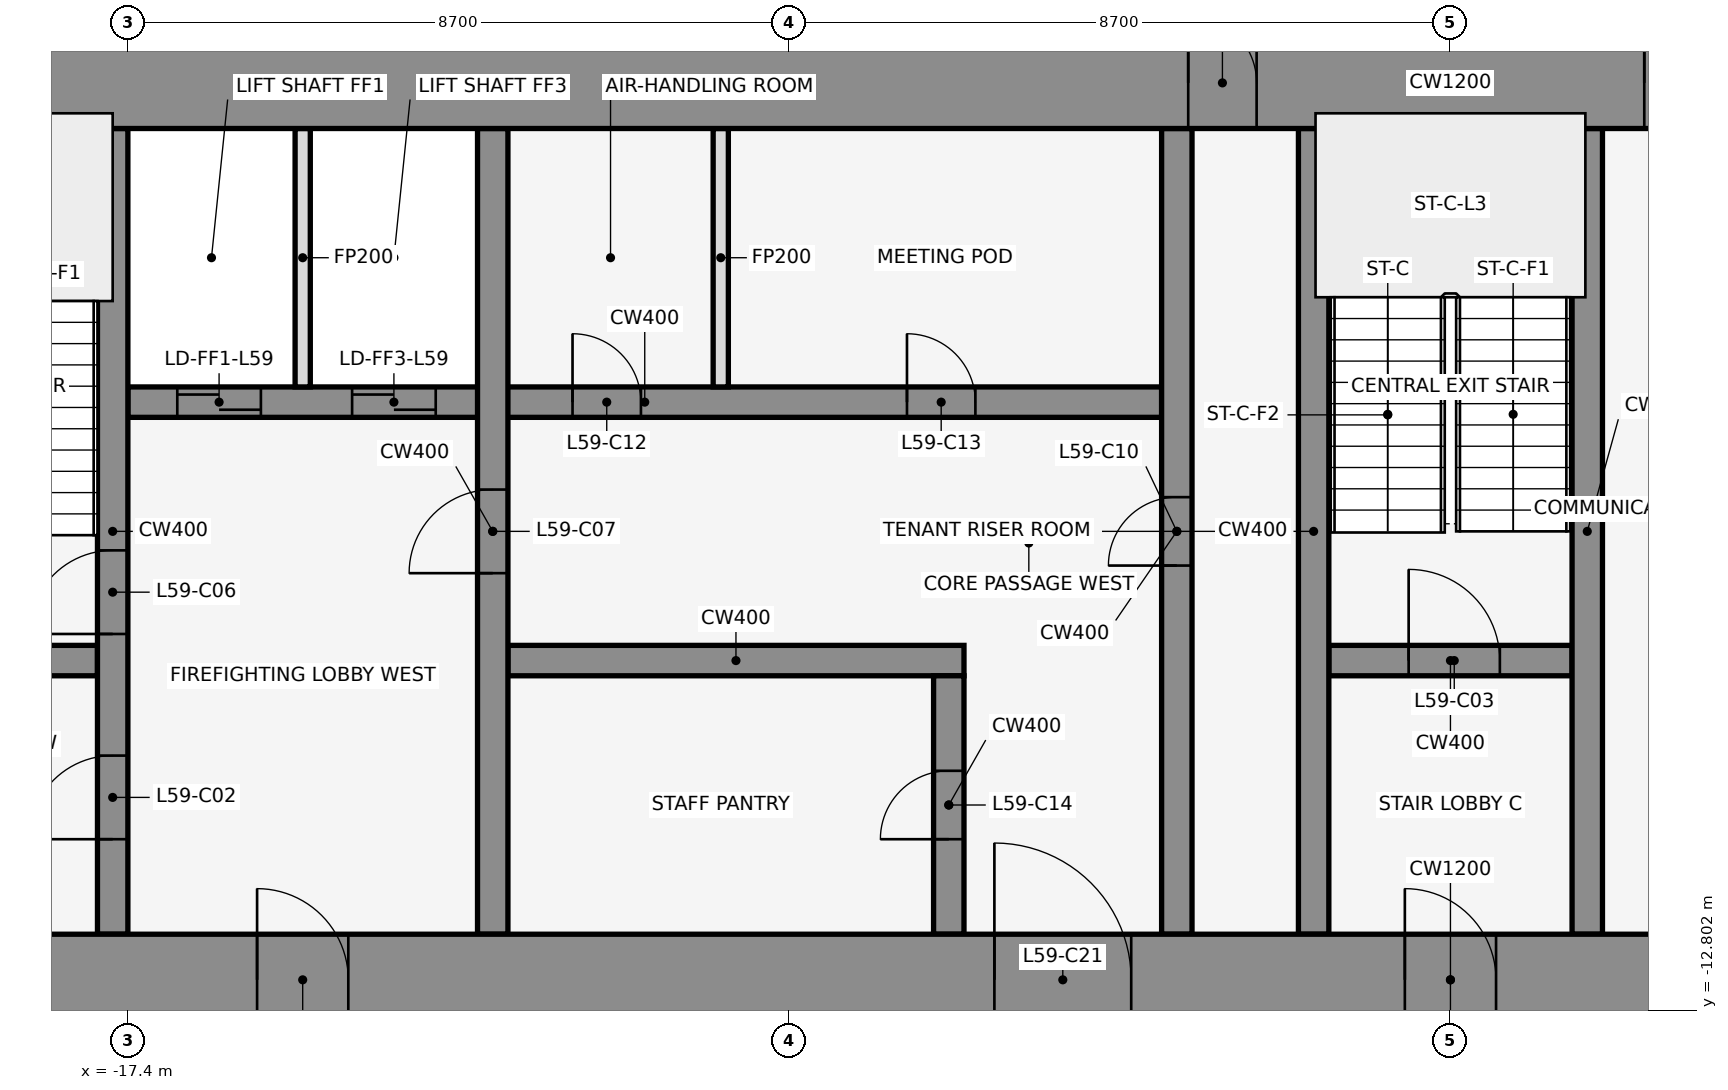
"""IFC4 building model, lengths in metres.
Left out: names, types, materials, properties, quantities, classifications, styles, units other than length and angle.
Written with IfcOpenShell. Run it as: python <this file> out.ifc"""

import sys

from ifc_helpers import new_model, si_unit, direction, frame, frame_2d, origin, place, context, subcontext, project, spatial, rectangle, extrude, element, fill, save


model = new_model("IFC4")
c1 = context("Model", 3, precision=1e-05, world=origin(), true_north=direction((0.0, 1.0)))
c2 = subcontext(c1, "Body", "Model", "MODEL_VIEW")
j1 = project(units=[si_unit("LENGTHUNIT", "METRE"), si_unit("PLANEANGLEUNIT", "RADIAN")], contexts=[c1])
p1 = place(None, origin())
s1 = spatial("IfcSite", under=j1, at=p1, CompositionType="ELEMENT")
p2 = place(p1, origin())
s2 = spatial("IfcBuilding", under=s1, at=p2, CompositionType="ELEMENT")
p3 = place(p2, frame((0.0, 0.0, 262.4)))
s3 = spatial("IfcBuildingStorey", under=s2, at=p3, CompositionType="ELEMENT", Elevation=262.4)
for number, where, z_axis, x_axis in (
    (1, (1.901, 1.08, 0.0), (0.0, 0.0, 1.0), (-0.84, -0.543, 0.0)),
    (2, (-0.068, -0.105, 0.0), (0.0, 0.0, 1.0), (-0.84, 0.543, 0.0)),
    (3, (-14.599, 1.08, 0.0), (0.0, 0.0, 1.0), (-0.84, -0.543, 0.0)),
):
    element("IfcWall", number, at=place(p3, frame(where, z_axis=z_axis, x_axis=x_axis)), inside=s3, PredefinedType="STANDARD", context=c2, shape_type="SweptSolid", body=[
        extrude(rectangle(XDim=2.183, YDim=0.25, at=frame_2d((1.091, 0.0))), origin(), (0.0, 0.0, 1.0), 4.05),
    ])
p4 = place(p3, frame((-20.8, -8.2, 0.0), z_axis=(0.0, 0.0, 1.0), x_axis=(1.0, 0.0, 0.0)))
e4 = element("IfcWall", 4, at=p4, inside=s3, PredefinedType="SHEAR", context=c2, shape_type="SweptSolid", body=[
    extrude(rectangle(XDim=3.0, YDim=0.4, at=frame_2d((1.5, 0.0))), origin(), (0.0, 0.0, 1.0), 4.2),
])
p5 = place(p4, frame((0.85, 0.0, 0.0)))
e5 = element("IfcOpeningElement", 5, at=p5, cuts=e4, PredefinedType="OPENING", context=c2, shape_type="SweptSolid", body=[
    extrude(rectangle(XDim=1.2, YDim=2.1, at=frame_2d((0.6, 1.05))), frame((0.0, 0.212, 0.0), z_axis=(0.0, -1.0, 0.0), x_axis=(1.0, 0.0, 0.0)), (0.0, 0.0, 1.0), 0.424),
])
p6 = place(p3, frame((-12.4, -8.2, 0.0), z_axis=(0.0, 0.0, 1.0), x_axis=(1.0, 0.0, 0.0)))
e6 = element("IfcWall", 6, at=p6, inside=s3, PredefinedType="SHEAR", context=c2, shape_type="SweptSolid", body=[
    extrude(rectangle(XDim=6.0, YDim=0.4, at=frame_2d((3.0, 0.0))), origin(), (0.0, 0.0, 1.0), 4.2),
])
p7 = place(p3, frame((-1.6, -8.2, 0.0), z_axis=(0.0, 0.0, 1.0), x_axis=(1.0, 0.0, 0.0)))
e7 = element("IfcWall", 7, at=p7, inside=s3, PredefinedType="SHEAR", context=c2, shape_type="SweptSolid", body=[
    extrude(rectangle(XDim=3.2, YDim=0.4, at=frame_2d((1.6, 0.0))), origin(), (0.0, 0.0, 1.0), 4.2),
])
p8 = place(p7, frame((1.05, 0.0, 0.0)))
e8 = element("IfcOpeningElement", 8, at=p8, cuts=e7, PredefinedType="OPENING", context=c2, shape_type="SweptSolid", body=[
    extrude(rectangle(XDim=1.2, YDim=2.1, at=frame_2d((0.6, 1.05))), frame((0.0, 0.212, 0.0), z_axis=(0.0, -1.0, 0.0), x_axis=(1.0, 0.0, 0.0)), (0.0, 0.0, 1.0), 0.424),
])
p9 = place(p3, frame((-17.4, -4.8, 0.0), z_axis=(0.0, 0.0, 1.0), x_axis=(1.0, 0.0, 0.0)))
e9 = element("IfcWall", 9, at=p9, inside=s3, PredefinedType="SHEAR", context=c2, shape_type="SweptSolid", body=[
    extrude(rectangle(XDim=13.6, YDim=0.4, at=frame_2d((6.8, 0.0))), origin(), (0.0, 0.0, 1.0), 4.2),
])
p10 = place(p9, frame((0.65, 0.0, 0.0)))
e10 = element("IfcOpeningElement", 10, at=p10, cuts=e9, PredefinedType="OPENING", context=c2, shape_type="SweptSolid", body=[
    extrude(rectangle(XDim=1.1, YDim=2.1, at=frame_2d((0.55, 1.05))), frame((0.0, 0.212, 0.0), z_axis=(0.0, -1.0, 0.0), x_axis=(1.0, 0.0, 0.0)), (0.0, 0.0, 1.0), 0.424),
])
p11 = place(p9, frame((2.95, 0.0, 0.0)))
e11 = element("IfcOpeningElement", 11, at=p11, cuts=e9, PredefinedType="OPENING", context=c2, shape_type="SweptSolid", body=[
    extrude(rectangle(XDim=1.1, YDim=2.1, at=frame_2d((0.55, 1.05))), frame((0.0, 0.212, 0.0), z_axis=(0.0, -1.0, 0.0), x_axis=(1.0, 0.0, 0.0)), (0.0, 0.0, 1.0), 0.424),
])
p12 = place(p9, frame((5.85, 0.0, 0.0)))
e12 = element("IfcOpeningElement", 12, at=p12, cuts=e9, PredefinedType="OPENING", context=c2, shape_type="SweptSolid", body=[
    extrude(rectangle(XDim=0.9, YDim=2.1, at=frame_2d((0.45, 1.05))), frame((0.0, 0.212, 0.0), z_axis=(0.0, -1.0, 0.0), x_axis=(1.0, 0.0, 0.0)), (0.0, 0.0, 1.0), 0.424),
])
p13 = place(p9, frame((10.25, 0.0, 0.0)))
e13 = element("IfcOpeningElement", 13, at=p13, cuts=e9, PredefinedType="OPENING", context=c2, shape_type="SweptSolid", body=[
    extrude(rectangle(XDim=0.9, YDim=2.1, at=frame_2d((0.45, 1.05))), frame((0.0, 0.212, 0.0), z_axis=(0.0, -1.0, 0.0), x_axis=(1.0, 0.0, 0.0)), (0.0, 0.0, 1.0), 0.424),
])
p14 = place(p3, frame((-17.6, -11.8, 0.0), z_axis=(0.0, 0.0, 1.0), x_axis=(0.0, 1.0, 0.0)))
e14 = element("IfcWall", 14, at=p14, inside=s3, PredefinedType="SHEAR", context=c2, shape_type="SweptSolid", body=[
    extrude(rectangle(XDim=10.6, YDim=0.4, at=frame_2d((5.3, 0.0))), origin(), (0.0, 0.0, 1.0), 4.2),
])
p15 = place(p14, frame((1.25, 0.0, 0.0)))
e15 = element("IfcOpeningElement", 15, at=p15, cuts=e14, PredefinedType="OPENING", context=c2, shape_type="SweptSolid", body=[
    extrude(rectangle(XDim=1.1, YDim=2.1, at=frame_2d((0.55, 1.05))), frame((0.0, 0.212, 0.0), z_axis=(0.0, -1.0, 0.0), x_axis=(1.0, 0.0, 0.0)), (0.0, 0.0, 1.0), 0.424),
])
p16 = place(p14, frame((3.95, 0.0, 0.0)))
e16 = element("IfcOpeningElement", 16, at=p16, cuts=e14, PredefinedType="OPENING", context=c2, shape_type="SweptSolid", body=[
    extrude(rectangle(XDim=1.1, YDim=2.1, at=frame_2d((0.55, 1.05))), frame((0.0, 0.212, 0.0), z_axis=(0.0, -1.0, 0.0), x_axis=(1.0, 0.0, 0.0)), (0.0, 0.0, 1.0), 0.424),
])
p17 = place(p3, frame((-15.1, -4.6, 0.0), z_axis=(0.0, 0.0, 1.0), x_axis=(0.0, 1.0, 0.0)))
e17 = element("IfcWall", 17, at=p17, inside=s3, PredefinedType="PARTITIONING", context=c2, shape_type="SweptSolid", body=[
    extrude(rectangle(XDim=3.4, YDim=0.2, at=frame_2d((1.7, 0.0))), origin(), (0.0, 0.0, 1.0), 3.118),
])
p18 = place(p3, frame((-12.6, -11.8, 0.0), z_axis=(0.0, 0.0, 1.0), x_axis=(0.0, 1.0, 0.0)))
e18 = element("IfcWall", 18, at=p18, inside=s3, PredefinedType="SHEAR", context=c2, shape_type="SweptSolid", body=[
    extrude(rectangle(XDim=10.6, YDim=0.4, at=frame_2d((5.3, 0.0))), origin(), (0.0, 0.0, 1.0), 4.2),
])
p19 = place(p18, frame((4.75, 0.0, 0.0)))
e19 = element("IfcOpeningElement", 19, at=p19, cuts=e18, PredefinedType="OPENING", context=c2, shape_type="SweptSolid", body=[
    extrude(rectangle(XDim=1.1, YDim=2.1, at=frame_2d((0.55, 1.05))), frame((0.0, 0.212, 0.0), z_axis=(0.0, -1.0, 0.0), x_axis=(1.0, 0.0, 0.0)), (0.0, 0.0, 1.0), 0.424),
])
p20 = place(p3, frame((-9.6, -4.6, 0.0), z_axis=(0.0, 0.0, 1.0), x_axis=(0.0, 1.0, 0.0)))
e20 = element("IfcWall", 20, at=p20, inside=s3, PredefinedType="PARTITIONING", context=c2, shape_type="SweptSolid", body=[
    extrude(rectangle(XDim=3.4, YDim=0.2, at=frame_2d((1.7, 0.0))), origin(), (0.0, 0.0, 1.0), 3.118),
])
p21 = place(p3, frame((-6.6, -11.8, 0.0), z_axis=(0.0, 0.0, 1.0), x_axis=(0.0, 1.0, 0.0)))
e21 = element("IfcWall", 21, at=p21, inside=s3, PredefinedType="SHEAR", context=c2, shape_type="SweptSolid", body=[
    extrude(rectangle(XDim=3.4, YDim=0.4, at=frame_2d((1.7, 0.0))), origin(), (0.0, 0.0, 1.0), 4.2),
])
p22 = place(p21, frame((1.25, 0.0, 0.0)))
e22 = element("IfcOpeningElement", 22, at=p22, cuts=e21, PredefinedType="OPENING", context=c2, shape_type="SweptSolid", body=[
    extrude(rectangle(XDim=0.9, YDim=2.1, at=frame_2d((0.45, 1.05))), frame((0.0, 0.212, 0.0), z_axis=(0.0, -1.0, 0.0), x_axis=(1.0, 0.0, 0.0)), (0.0, 0.0, 1.0), 0.424),
])
p23 = place(p3, frame((-3.6, -11.8, 0.0), z_axis=(0.0, 0.0, 1.0), x_axis=(0.0, 1.0, 0.0)))
e23 = element("IfcWall", 23, at=p23, inside=s3, PredefinedType="SHEAR", context=c2, shape_type="SweptSolid", body=[
    extrude(rectangle(XDim=10.6, YDim=0.4, at=frame_2d((5.3, 0.0))), origin(), (0.0, 0.0, 1.0), 4.2),
])
p24 = place(p23, frame((4.85, 0.0, 0.0)))
e24 = element("IfcOpeningElement", 24, at=p24, cuts=e23, PredefinedType="OPENING", context=c2, shape_type="SweptSolid", body=[
    extrude(rectangle(XDim=0.9, YDim=2.1, at=frame_2d((0.45, 1.05))), frame((0.0, 0.212, 0.0), z_axis=(0.0, -1.0, 0.0), x_axis=(1.0, 0.0, 0.0)), (0.0, 0.0, 1.0), 0.424),
])
for number, where, z_axis, x_axis in (
    (25, (-1.8, -11.8, 0.0), (0.0, 0.0, 1.0), (0.0, 1.0, 0.0)),
    (26, (1.8, -11.8, 0.0), (0.0, 0.0, 1.0), (0.0, 1.0, 0.0)),
):
    element("IfcWall", number, at=place(p3, frame(where, z_axis=z_axis, x_axis=x_axis)), inside=s3, PredefinedType="SHEAR", context=c2, shape_type="SweptSolid", body=[
        extrude(rectangle(XDim=10.6, YDim=0.4, at=frame_2d((5.3, 0.0))), origin(), (0.0, 0.0, 1.0), 4.2),
    ])
p25 = place(p3, frame((-22.0, -0.6, 0.0), z_axis=(0.0, 0.0, 1.0), x_axis=(1.0, 0.0, 0.0)))
e27 = element("IfcWall", 27, at=p25, inside=s3, PredefinedType="SHEAR", context=c2, shape_type="SweptSolid", body=[
    extrude(rectangle(XDim=44.0, YDim=1.2, at=frame_2d((22.0, 0.0))), origin(), (0.0, 0.0, 1.0), 4.2),
])
p26 = place(p25, frame((18.55, 0.0, 0.0)))
e28 = element("IfcOpeningElement", 28, at=p26, cuts=e27, PredefinedType="OPENING", context=c2, shape_type="SweptSolid", body=[
    extrude(rectangle(XDim=0.9, YDim=2.1, at=frame_2d((0.45, 1.05))), frame((0.0, 0.612, 0.0), z_axis=(0.0, -1.0, 0.0), x_axis=(1.0, 0.0, 0.0)), (0.0, 0.0, 1.0), 1.224),
])
p27 = place(p25, frame((24.55, 0.0, 0.0)))
e29 = element("IfcOpeningElement", 29, at=p27, cuts=e27, PredefinedType="OPENING", context=c2, shape_type="SweptSolid", body=[
    extrude(rectangle(XDim=0.9, YDim=2.1, at=frame_2d((0.45, 1.05))), frame((0.0, 0.612, 0.0), z_axis=(0.0, -1.0, 0.0), x_axis=(1.0, 0.0, 0.0)), (0.0, 0.0, 1.0), 1.224),
])
p28 = place(p3, frame((-22.0, -12.4, 0.0), z_axis=(0.0, 0.0, 1.0), x_axis=(1.0, 0.0, 0.0)))
e30 = element("IfcWall", 30, at=p28, inside=s3, PredefinedType="SHEAR", context=c2, shape_type="SweptSolid", body=[
    extrude(rectangle(XDim=44.0, YDim=1.2, at=frame_2d((22.0, 0.0))), origin(), (0.0, 0.0, 1.0), 4.2),
])
p29 = place(p28, frame((2.2, 0.0, 0.0)))
e31 = element("IfcOpeningElement", 31, at=p29, cuts=e30, PredefinedType="OPENING", context=c2, shape_type="SweptSolid", body=[
    extrude(rectangle(XDim=1.2, YDim=2.1, at=frame_2d((0.6, 1.05))), frame((0.0, 0.612, 0.0), z_axis=(0.0, -1.0, 0.0), x_axis=(1.0, 0.0, 0.0)), (0.0, 0.0, 1.0), 1.224),
])
p30 = place(p28, frame((21.4, 0.0, 0.0)))
e32 = element("IfcOpeningElement", 32, at=p30, cuts=e30, PredefinedType="OPENING", context=c2, shape_type="SweptSolid", body=[
    extrude(rectangle(XDim=1.2, YDim=2.1, at=frame_2d((0.6, 1.05))), frame((0.0, 0.612, 0.0), z_axis=(0.0, -1.0, 0.0), x_axis=(1.0, 0.0, 0.0)), (0.0, 0.0, 1.0), 1.224),
])
p31 = place(p28, frame((40.6, 0.0, 0.0)))
e33 = element("IfcOpeningElement", 33, at=p31, cuts=e30, PredefinedType="OPENING", context=c2, shape_type="SweptSolid", body=[
    extrude(rectangle(XDim=1.2, YDim=2.1, at=frame_2d((0.6, 1.05))), frame((0.0, 0.612, 0.0), z_axis=(0.0, -1.0, 0.0), x_axis=(1.0, 0.0, 0.0)), (0.0, 0.0, 1.0), 1.224),
])
p32 = place(p28, frame((16.0, 0.0, 0.0)))
e34 = element("IfcOpeningElement", 34, at=p32, cuts=e30, PredefinedType="OPENING", context=c2, shape_type="SweptSolid", body=[
    extrude(rectangle(XDim=1.8, YDim=2.1, at=frame_2d((0.9, 1.05))), frame((0.0, 0.612, 0.0), z_axis=(0.0, -1.0, 0.0), x_axis=(1.0, 0.0, 0.0)), (0.0, 0.0, 1.0), 1.224),
])
p33 = place(p28, frame((6.3, 0.0, 0.0)))
e35 = element("IfcOpeningElement", 35, at=p33, cuts=e30, PredefinedType="OPENING", context=c2, shape_type="SweptSolid", body=[
    extrude(rectangle(XDim=1.2, YDim=2.1, at=frame_2d((0.6, 1.05))), frame((0.0, 0.612, 0.0), z_axis=(0.0, -1.0, 0.0), x_axis=(1.0, 0.0, 0.0)), (0.0, 0.0, 1.0), 1.224),
])
p34 = place(p28, frame((26.2, 0.0, 0.0)))
e36 = element("IfcOpeningElement", 36, at=p34, cuts=e30, PredefinedType="OPENING", context=c2, shape_type="SweptSolid", body=[
    extrude(rectangle(XDim=1.8, YDim=2.1, at=frame_2d((0.9, 1.05))), frame((0.0, 0.612, 0.0), z_axis=(0.0, -1.0, 0.0), x_axis=(1.0, 0.0, 0.0)), (0.0, 0.0, 1.0), 1.224),
])
p35 = place(p28, frame((36.5, 0.0, 0.0)))
e37 = element("IfcOpeningElement", 37, at=p35, cuts=e30, PredefinedType="OPENING", context=c2, shape_type="SweptSolid", body=[
    extrude(rectangle(XDim=1.2, YDim=2.1, at=frame_2d((0.6, 1.05))), frame((0.0, 0.612, 0.0), z_axis=(0.0, -1.0, 0.0), x_axis=(1.0, 0.0, 0.0)), (0.0, 0.0, 1.0), 1.224),
])
p36 = place(p15, frame((1.1, 0.0, 0.0), z_axis=(0.0, 0.0, 1.0), x_axis=(-1.0, 0.0, 0.0)))
e38 = element("IfcDoor", 38, at=p36, inside=s3, OperationType="SINGLE_SWING_LEFT", PredefinedType="DOOR", context=c2, shape_type="SweptSolid", body=[
    extrude(rectangle(XDim=1.1, YDim=2.1, at=frame_2d((0.55, 1.05))), frame((0.0, 0.025, 0.0), z_axis=(0.0, -1.0, 0.0), x_axis=(1.0, 0.0, 0.0)), (0.0, 0.0, 1.0), 0.05),
])
fill(e15, e38)
p37 = place(p8, origin())
e39 = element("IfcDoor", 39, at=p37, inside=s3, OperationType="SINGLE_SWING_LEFT", PredefinedType="DOOR", context=c2, shape_type="SweptSolid", body=[
    extrude(rectangle(XDim=1.2, YDim=2.1, at=frame_2d((0.6, 1.05))), frame((0.0, 0.025, 0.0), z_axis=(0.0, -1.0, 0.0), x_axis=(1.0, 0.0, 0.0)), (0.0, 0.0, 1.0), 0.05),
])
fill(e8, e39)
p38 = place(p10, origin())
e40 = element("IfcDoor", 40, at=p38, inside=s3, OperationType="DOUBLE_DOOR_SLIDING", PredefinedType="DOOR", context=c2, shape_type="SweptSolid", body=[
    extrude(rectangle(XDim=1.1, YDim=2.1, at=frame_2d((0.55, 1.05))), frame((0.0, 0.025, 0.0), z_axis=(0.0, -1.0, 0.0), x_axis=(1.0, 0.0, 0.0)), (0.0, 0.0, 1.0), 0.05),
])
fill(e10, e40)
p39 = place(p11, origin())
e41 = element("IfcDoor", 41, at=p39, inside=s3, OperationType="DOUBLE_DOOR_SLIDING", PredefinedType="DOOR", context=c2, shape_type="SweptSolid", body=[
    extrude(rectangle(XDim=1.1, YDim=2.1, at=frame_2d((0.55, 1.05))), frame((0.0, 0.025, 0.0), z_axis=(0.0, -1.0, 0.0), x_axis=(1.0, 0.0, 0.0)), (0.0, 0.0, 1.0), 0.05),
])
fill(e11, e41)
p40 = place(p16, frame((1.1, 0.0, 0.0), z_axis=(0.0, 0.0, 1.0), x_axis=(-1.0, 0.0, 0.0)))
e42 = element("IfcDoor", 42, at=p40, inside=s3, OperationType="SINGLE_SWING_LEFT", PredefinedType="DOOR", context=c2, shape_type="SweptSolid", body=[
    extrude(rectangle(XDim=1.1, YDim=2.1, at=frame_2d((0.55, 1.05))), frame((0.0, 0.025, 0.0), z_axis=(0.0, -1.0, 0.0), x_axis=(1.0, 0.0, 0.0)), (0.0, 0.0, 1.0), 0.05),
])
fill(e16, e42)
p41 = place(p19, origin())
e43 = element("IfcDoor", 43, at=p41, inside=s3, OperationType="SINGLE_SWING_LEFT", PredefinedType="DOOR", context=c2, shape_type="SweptSolid", body=[
    extrude(rectangle(XDim=1.1, YDim=2.1, at=frame_2d((0.55, 1.05))), frame((0.0, 0.025, 0.0), z_axis=(0.0, -1.0, 0.0), x_axis=(1.0, 0.0, 0.0)), (0.0, 0.0, 1.0), 0.05),
])
fill(e19, e43)
p42 = place(p24, frame((0.9, 0.0, 0.0), z_axis=(0.0, 0.0, 1.0), x_axis=(-1.0, 0.0, 0.0)))
e44 = element("IfcDoor", 44, at=p42, inside=s3, OperationType="SINGLE_SWING_LEFT", PredefinedType="DOOR", context=c2, shape_type="SweptSolid", body=[
    extrude(rectangle(XDim=0.9, YDim=2.1, at=frame_2d((0.45, 1.05))), frame((0.0, 0.025, 0.0), z_axis=(0.0, -1.0, 0.0), x_axis=(1.0, 0.0, 0.0)), (0.0, 0.0, 1.0), 0.05),
])
fill(e24, e44)
p43 = place(p12, origin())
e45 = element("IfcDoor", 45, at=p43, inside=s3, OperationType="SINGLE_SWING_RIGHT", PredefinedType="DOOR", context=c2, shape_type="SweptSolid", body=[
    extrude(rectangle(XDim=0.9, YDim=2.1, at=frame_2d((0.45, 1.05))), frame((0.0, 0.025, 0.0), z_axis=(0.0, -1.0, 0.0), x_axis=(1.0, 0.0, 0.0)), (0.0, 0.0, 1.0), 0.05),
])
fill(e12, e45)
p44 = place(p13, origin())
e46 = element("IfcDoor", 46, at=p44, inside=s3, OperationType="SINGLE_SWING_LEFT", PredefinedType="DOOR", context=c2, shape_type="SweptSolid", body=[
    extrude(rectangle(XDim=0.9, YDim=2.1, at=frame_2d((0.45, 1.05))), frame((0.0, 0.025, 0.0), z_axis=(0.0, -1.0, 0.0), x_axis=(1.0, 0.0, 0.0)), (0.0, 0.0, 1.0), 0.05),
])
fill(e13, e46)
p45 = place(p22, origin())
e47 = element("IfcDoor", 47, at=p45, inside=s3, OperationType="SINGLE_SWING_RIGHT", PredefinedType="DOOR", context=c2, shape_type="SweptSolid", body=[
    extrude(rectangle(XDim=0.9, YDim=2.1, at=frame_2d((0.45, 1.05))), frame((0.0, 0.025, 0.0), z_axis=(0.0, -1.0, 0.0), x_axis=(1.0, 0.0, 0.0)), (0.0, 0.0, 1.0), 0.05),
])
fill(e22, e47)
p46 = place(p26, origin())
e48 = element("IfcDoor", 48, at=p46, inside=s3, OperationType="SINGLE_SWING_LEFT", PredefinedType="DOOR", context=c2, shape_type="SweptSolid", body=[
    extrude(rectangle(XDim=0.9, YDim=2.1, at=frame_2d((0.45, 1.05))), frame((0.0, 0.025, 0.0), z_axis=(0.0, -1.0, 0.0), x_axis=(1.0, 0.0, 0.0)), (0.0, 0.0, 1.0), 0.05),
])
fill(e28, e48)
p47 = place(p27, origin())
e49 = element("IfcDoor", 49, at=p47, inside=s3, OperationType="SINGLE_SWING_LEFT", PredefinedType="DOOR", context=c2, shape_type="SweptSolid", body=[
    extrude(rectangle(XDim=0.9, YDim=2.1, at=frame_2d((0.45, 1.05))), frame((0.0, 0.025, 0.0), z_axis=(0.0, -1.0, 0.0), x_axis=(1.0, 0.0, 0.0)), (0.0, 0.0, 1.0), 0.05),
])
fill(e29, e49)
p48 = place(p30, frame((1.2, 0.0, 0.0), z_axis=(0.0, 0.0, 1.0), x_axis=(-1.0, 0.0, 0.0)))
e50 = element("IfcDoor", 50, at=p48, inside=s3, OperationType="SINGLE_SWING_RIGHT", PredefinedType="DOOR", context=c2, shape_type="SweptSolid", body=[
    extrude(rectangle(XDim=1.2, YDim=2.1, at=frame_2d((0.6, 1.05))), frame((0.0, 0.025, 0.0), z_axis=(0.0, -1.0, 0.0), x_axis=(1.0, 0.0, 0.0)), (0.0, 0.0, 1.0), 0.05),
])
fill(e32, e50)
p49 = place(p32, origin())
e51 = element("IfcDoor", 51, at=p49, inside=s3, OperationType="SINGLE_SWING_LEFT", PredefinedType="DOOR", context=c2, shape_type="SweptSolid", body=[
    extrude(rectangle(XDim=1.8, YDim=2.1, at=frame_2d((0.9, 1.05))), frame((0.0, 0.025, 0.0), z_axis=(0.0, -1.0, 0.0), x_axis=(1.0, 0.0, 0.0)), (0.0, 0.0, 1.0), 0.05),
])
fill(e34, e51)
p50 = place(p33, frame((1.2, 0.0, 0.0), z_axis=(0.0, 0.0, 1.0), x_axis=(-1.0, 0.0, 0.0)))
e52 = element("IfcDoor", 52, at=p50, inside=s3, OperationType="SINGLE_SWING_RIGHT", PredefinedType="DOOR", context=c2, shape_type="SweptSolid", body=[
    extrude(rectangle(XDim=1.2, YDim=2.1, at=frame_2d((0.6, 1.05))), frame((0.0, 0.025, 0.0), z_axis=(0.0, -1.0, 0.0), x_axis=(1.0, 0.0, 0.0)), (0.0, 0.0, 1.0), 0.05),
])
fill(e35, e52)
save(model, sys.argv[1])
